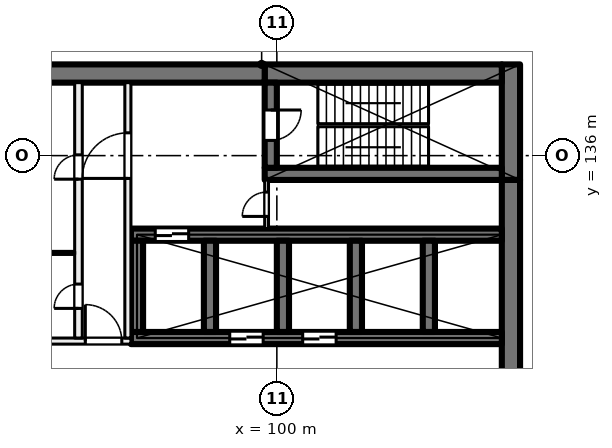
"""IFC4 building model, lengths in metres.
Left out: names, types, materials, properties, quantities, classifications, styles, units other than length and angle.
Written with IfcOpenShell. Run it as: python <this file> out.ifc"""

import sys

from ifc_helpers import new_model, si_unit, direction, frame, frame_2d, origin, place, context, subcontext, project, spatial, rectangle, extrude, element, fill, save


model = new_model("IFC4")
c1 = context("Model", 3, precision=1e-05, world=origin(), true_north=direction((0.0, 1.0)))
c2 = subcontext(c1, "Body", "Model", "MODEL_VIEW")
j1 = project(units=[si_unit("LENGTHUNIT", "METRE"), si_unit("PLANEANGLEUNIT", "RADIAN")], contexts=[c1])
p1 = place(None, origin())
s1 = spatial("IfcSite", under=j1, at=p1, CompositionType="ELEMENT")
p2 = place(p1, origin())
s2 = spatial("IfcBuilding", under=s1, at=p2, CompositionType="ELEMENT")
p3 = place(p2, frame((0.0, 0.0, 12.5)))
s3 = spatial("IfcBuildingStorey", under=s2, at=p3, CompositionType="ELEMENT", Elevation=12.5)
p4 = place(p3, frame((107.7, 139.0, 0.0), z_axis=(0.0, 0.0, 1.0), x_axis=(0.0, -1.0, 0.0)))
e1 = element("IfcWall", 1, at=p4, inside=s3, PredefinedType="SHEAR", context=c2, shape_type="SweptSolid", body=[
    extrude(rectangle(XDim=3.8, YDim=0.6, at=frame_2d((1.9, 0.0))), origin(), (0.0, 0.0, 1.0), 5.0),
])
p5 = place(p3, frame((107.7, 135.2, 0.0), z_axis=(0.0, 0.0, 1.0), x_axis=(0.0, -1.0, 0.0)))
e2 = element("IfcWall", 2, at=p5, inside=s3, PredefinedType="SHEAR", context=c2, shape_type="SweptSolid", body=[
    extrude(rectangle(XDim=14.4, YDim=0.6, at=frame_2d((7.2, 0.0))), origin(), (0.0, 0.0, 1.0), 5.0),
])
p6 = place(p3, frame((107.4, 138.7, 0.0), z_axis=(0.0, 0.0, 1.0), x_axis=(-1.0, 0.0, 0.0)))
e3 = element("IfcWall", 3, at=p6, inside=s3, PredefinedType="SHEAR", context=c2, shape_type="SweptSolid", body=[
    extrude(rectangle(XDim=7.8, YDim=0.6, at=frame_2d((3.9, 0.0))), origin(), (0.0, 0.0, 1.0), 5.0),
])
p7 = place(p3, frame((99.6, 138.7, 0.0), z_axis=(0.0, 0.0, 1.0), x_axis=(-1.0, 0.0, 0.0)))
e4 = element("IfcWall", 4, at=p7, inside=s3, PredefinedType="SHEAR", context=c2, shape_type="SweptSolid", body=[
    extrude(rectangle(XDim=8.9, YDim=0.6, at=frame_2d((4.45, 0.0))), origin(), (0.0, 0.0, 1.0), 5.0),
])
p8 = place(p3, frame((107.4, 135.4, 0.0), z_axis=(0.0, 0.0, 1.0), x_axis=(-1.0, 0.0, 0.0)))
e5 = element("IfcWall", 5, at=p8, inside=s3, PredefinedType="SHEAR", context=c2, shape_type="SweptSolid", body=[
    extrude(rectangle(XDim=7.8, YDim=0.4, at=frame_2d((3.9, 0.0))), origin(), (0.0, 0.0, 1.0), 5.0),
])
p9 = place(p3, frame((99.8, 138.4, 0.0), z_axis=(0.0, 0.0, 1.0), x_axis=(0.0, -1.0, 0.0)))
e6 = element("IfcWall", 6, at=p9, inside=s3, PredefinedType="SHEAR", context=c2, shape_type="SweptSolid", body=[
    extrude(rectangle(XDim=2.8, YDim=0.4, at=frame_2d((1.4, 0.0))), origin(), (0.0, 0.0, 1.0), 5.0),
])
p10 = place(p9, frame((0.9, 0.0, 0.0)))
e7 = element("IfcOpeningElement", 7, at=p10, cuts=e6, PredefinedType="OPENING", context=c2, shape_type="SweptSolid", body=[
    extrude(rectangle(XDim=1.0, YDim=2.1, at=frame_2d((0.5, 1.05))), frame((0.0, 0.21, 0.0), z_axis=(0.0, -1.0, 0.0), x_axis=(1.0, 0.0, 0.0)), (0.0, 0.0, 1.0), 0.42),
])
p11 = place(p3, frame((107.4, 130.0, 0.0), z_axis=(0.0, 0.0, 1.0), x_axis=(-1.0, 0.0, 0.0)))
e8 = element("IfcWall", 8, at=p11, inside=s3, PredefinedType="SHEAR", context=c2, shape_type="SweptSolid", body=[
    extrude(rectangle(XDim=12.2, YDim=0.4, at=frame_2d((6.1, 0.0))), origin(), (0.0, 0.0, 1.0), 5.0),
])
p12 = place(p11, frame((5.45, 0.0, 0.0)))
e9 = element("IfcOpeningElement", 9, at=p12, cuts=e8, PredefinedType="OPENING", context=c2, shape_type="SweptSolid", body=[
    extrude(rectangle(XDim=1.1, YDim=2.1, at=frame_2d((0.55, 1.05))), frame((0.0, 0.21, 0.0), z_axis=(0.0, -1.0, 0.0), x_axis=(1.0, 0.0, 0.0)), (0.0, 0.0, 1.0), 0.42),
])
p13 = place(p11, frame((7.85, 0.0, 0.0)))
e10 = element("IfcOpeningElement", 10, at=p13, cuts=e8, PredefinedType="OPENING", context=c2, shape_type="SweptSolid", body=[
    extrude(rectangle(XDim=1.1, YDim=2.1, at=frame_2d((0.55, 1.05))), frame((0.0, 0.21, 0.0), z_axis=(0.0, -1.0, 0.0), x_axis=(1.0, 0.0, 0.0)), (0.0, 0.0, 1.0), 0.42),
])
p14 = place(p3, frame((107.4, 133.4, 0.0), z_axis=(0.0, 0.0, 1.0), x_axis=(-1.0, 0.0, 0.0)))
e11 = element("IfcWall", 11, at=p14, inside=s3, PredefinedType="SHEAR", context=c2, shape_type="SweptSolid", body=[
    extrude(rectangle(XDim=12.2, YDim=0.4, at=frame_2d((6.1, 0.0))), origin(), (0.0, 0.0, 1.0), 5.0),
])
p15 = place(p14, frame((10.3, 0.0, 0.0)))
e12 = element("IfcOpeningElement", 12, at=p15, cuts=e11, PredefinedType="OPENING", context=c2, shape_type="SweptSolid", body=[
    extrude(rectangle(XDim=1.1, YDim=2.1, at=frame_2d((0.55, 1.05))), frame((0.0, 0.21, 0.0), z_axis=(0.0, -1.0, 0.0), x_axis=(1.0, 0.0, 0.0)), (0.0, 0.0, 1.0), 0.42),
])
for number, where, z_axis, x_axis in (
    (13, (105.0, 133.2, 0.0), (0.0, 0.0, 1.0), (0.0, -1.0, 0.0)),
    (14, (102.6, 133.2, 0.0), (0.0, 0.0, 1.0), (0.0, -1.0, 0.0)),
    (15, (100.2, 133.2, 0.0), (0.0, 0.0, 1.0), (0.0, -1.0, 0.0)),
    (16, (97.8, 133.2, 0.0), (0.0, 0.0, 1.0), (0.0, -1.0, 0.0)),
    (17, (95.4, 133.2, 0.0), (0.0, 0.0, 1.0), (0.0, -1.0, 0.0)),
):
    element("IfcWall", number, at=place(p3, frame(where, z_axis=z_axis, x_axis=x_axis)), inside=s3, PredefinedType="SHEAR", context=c2, shape_type="SweptSolid", body=[
        extrude(rectangle(XDim=3.0, YDim=0.4, at=frame_2d((1.5, 0.0))), origin(), (0.0, 0.0, 1.0), 5.0),
    ])
p16 = place(p3, frame((91.4, 129.9, 0.0), z_axis=(0.0, 0.0, 1.0), x_axis=(1.0, 0.0, 0.0)))
e18 = element("IfcWall", 18, at=p16, inside=s3, PredefinedType="PARTITIONING", context=c2, shape_type="SweptSolid", body=[
    extrude(rectangle(XDim=3.8, YDim=0.2, at=frame_2d((1.9, 0.0))), origin(), (0.0, 0.0, 1.0), 4.6),
])
p17 = place(p16, frame((2.3, 0.0, 0.0)))
e19 = element("IfcOpeningElement", 19, at=p17, cuts=e18, PredefinedType="OPENING", context=c2, shape_type="SweptSolid", body=[
    extrude(rectangle(XDim=1.2, YDim=2.1, at=frame_2d((0.6, 1.05))), frame((0.0, 0.11, 0.0), z_axis=(0.0, -1.0, 0.0), x_axis=(1.0, 0.0, 0.0)), (0.0, 0.0, 1.0), 0.22),
])
p18 = place(p3, frame((95.1, 130.0, 0.0), z_axis=(0.0, 0.0, 1.0), x_axis=(0.0, 1.0, 0.0)))
e20 = element("IfcWall", 20, at=p18, inside=s3, PredefinedType="PARTITIONING", context=c2, shape_type="SweptSolid", body=[
    extrude(rectangle(XDim=8.4, YDim=0.2, at=frame_2d((4.2, 0.0))), origin(), (0.0, 0.0, 1.0), 4.6),
])
p19 = place(p18, frame((5.25, 0.0, 0.0)))
e21 = element("IfcOpeningElement", 21, at=p19, cuts=e20, PredefinedType="OPENING", context=c2, shape_type="SweptSolid", body=[
    extrude(rectangle(XDim=1.5, YDim=2.1, at=frame_2d((0.75, 1.05))), frame((0.0, 0.11, 0.0), z_axis=(0.0, -1.0, 0.0), x_axis=(1.0, 0.0, 0.0)), (0.0, 0.0, 1.0), 0.22),
])
p20 = place(p3, frame((93.475, 130.0, 0.0), z_axis=(0.0, 0.0, 1.0), x_axis=(0.0, 1.0, 0.0)))
e22 = element("IfcWall", 22, at=p20, inside=s3, PredefinedType="PARTITIONING", context=c2, shape_type="SweptSolid", body=[
    extrude(rectangle(XDim=8.4, YDim=0.25, at=frame_2d((4.2, 0.0))), origin(), (0.0, 0.0, 1.0), 4.6),
])
p21 = place(p20, frame((0.975, 0.0, 0.0)))
e23 = element("IfcOpeningElement", 23, at=p21, cuts=e22, PredefinedType="OPENING", context=c2, shape_type="SweptSolid", body=[
    extrude(rectangle(XDim=0.8, YDim=2.1, at=frame_2d((0.4, 1.05))), frame((0.0, 0.135, 0.0), z_axis=(0.0, -1.0, 0.0), x_axis=(1.0, 0.0, 0.0)), (0.0, 0.0, 1.0), 0.27),
])
p22 = place(p20, frame((5.225, 0.0, 0.0)))
e24 = element("IfcOpeningElement", 24, at=p22, cuts=e22, PredefinedType="OPENING", context=c2, shape_type="SweptSolid", body=[
    extrude(rectangle(XDim=0.8, YDim=2.1, at=frame_2d((0.4, 1.05))), frame((0.0, 0.135, 0.0), z_axis=(0.0, -1.0, 0.0), x_axis=(1.0, 0.0, 0.0)), (0.0, 0.0, 1.0), 0.27),
])
p23 = place(p3, frame((99.663, 133.6, 0.0), z_axis=(0.0, 0.0, 1.0), x_axis=(0.0, 1.0, 0.0)))
e25 = element("IfcWall", 25, at=p23, inside=s3, PredefinedType="PARTITIONING", context=c2, shape_type="SweptSolid", body=[
    extrude(rectangle(XDim=1.6, YDim=0.125, at=frame_2d((0.8, 0.0))), origin(), (0.0, 0.0, 1.0), 4.6),
])
p24 = place(p23, frame((0.4, 0.0, 0.0)))
e26 = element("IfcOpeningElement", 26, at=p24, cuts=e25, PredefinedType="OPENING", context=c2, shape_type="SweptSolid", body=[
    extrude(rectangle(XDim=0.8, YDim=2.1, at=frame_2d((0.4, 1.05))), frame((0.0, 0.073, 0.0), z_axis=(0.0, -1.0, 0.0), x_axis=(1.0, 0.0, 0.0)), (0.0, 0.0, 1.0), 0.145),
])
p25 = place(p3, frame((91.4, 132.8, 0.0), z_axis=(0.0, 0.0, 1.0), x_axis=(1.0, 0.0, 0.0)))
e27 = element("IfcWall", 27, at=p25, inside=s3, PredefinedType="PARTITIONING", context=c2, shape_type="SweptSolid", body=[
    extrude(rectangle(XDim=1.95, YDim=0.1, at=frame_2d((0.975, 0.0))), origin(), (0.0, 0.0, 1.0), 4.6),
])
p26 = place(p12, origin())
e28 = element("IfcDoor", 28, at=p26, inside=s3, OperationType="DOUBLE_DOOR_SLIDING", PredefinedType="DOOR", context=c2, shape_type="SweptSolid", body=[
    extrude(rectangle(XDim=1.1, YDim=2.1, at=frame_2d((0.55, 1.05))), frame((0.0, 0.025, 0.0), z_axis=(0.0, -1.0, 0.0), x_axis=(1.0, 0.0, 0.0)), (0.0, 0.0, 1.0), 0.05),
])
fill(e9, e28)
p27 = place(p13, origin())
e29 = element("IfcDoor", 29, at=p27, inside=s3, OperationType="DOUBLE_DOOR_SLIDING", PredefinedType="DOOR", context=c2, shape_type="SweptSolid", body=[
    extrude(rectangle(XDim=1.1, YDim=2.1, at=frame_2d((0.55, 1.05))), frame((0.0, 0.025, 0.0), z_axis=(0.0, -1.0, 0.0), x_axis=(1.0, 0.0, 0.0)), (0.0, 0.0, 1.0), 0.05),
])
fill(e10, e29)
p28 = place(p17, origin())
e30 = element("IfcDoor", 30, at=p28, inside=s3, OperationType="DOUBLE_DOOR_SINGLE_SWING", PredefinedType="DOOR", context=c2, shape_type="SweptSolid", body=[
    extrude(rectangle(XDim=1.2, YDim=2.1, at=frame_2d((0.6, 1.05))), frame((0.0, 0.025, 0.0), z_axis=(0.0, -1.0, 0.0), x_axis=(1.0, 0.0, 0.0)), (0.0, 0.0, 1.0), 0.05),
])
fill(e19, e30)
p29 = place(p19, origin())
e31 = element("IfcDoor", 31, at=p29, inside=s3, OperationType="DOUBLE_DOOR_SINGLE_SWING", PredefinedType="DOOR", context=c2, shape_type="SweptSolid", body=[
    extrude(rectangle(XDim=1.5, YDim=2.1, at=frame_2d((0.75, 1.05))), frame((0.0, 0.025, 0.0), z_axis=(0.0, -1.0, 0.0), x_axis=(1.0, 0.0, 0.0)), (0.0, 0.0, 1.0), 0.05),
])
fill(e21, e31)
p30 = place(p10, origin())
e32 = element("IfcDoor", 32, at=p30, inside=s3, OperationType="SINGLE_SWING_RIGHT", PredefinedType="DOOR", context=c2, shape_type="SweptSolid", body=[
    extrude(rectangle(XDim=1.0, YDim=2.1, at=frame_2d((0.5, 1.05))), frame((0.0, 0.025, 0.0), z_axis=(0.0, -1.0, 0.0), x_axis=(1.0, 0.0, 0.0)), (0.0, 0.0, 1.0), 0.05),
])
fill(e7, e32)
p31 = place(p24, origin())
e33 = element("IfcDoor", 33, at=p31, inside=s3, OperationType="SINGLE_SWING_LEFT", PredefinedType="DOOR", context=c2, shape_type="SweptSolid", body=[
    extrude(rectangle(XDim=0.8, YDim=2.1, at=frame_2d((0.4, 1.05))), frame((0.0, 0.025, 0.0), z_axis=(0.0, -1.0, 0.0), x_axis=(1.0, 0.0, 0.0)), (0.0, 0.0, 1.0), 0.05),
])
fill(e26, e33)
p32 = place(p21, origin())
e34 = element("IfcDoor", 34, at=p32, inside=s3, OperationType="SINGLE_SWING_RIGHT", PredefinedType="DOOR", context=c2, shape_type="SweptSolid", body=[
    extrude(rectangle(XDim=0.8, YDim=2.1, at=frame_2d((0.4, 1.05))), frame((0.0, 0.025, 0.0), z_axis=(0.0, -1.0, 0.0), x_axis=(1.0, 0.0, 0.0)), (0.0, 0.0, 1.0), 0.05),
])
fill(e23, e34)
p33 = place(p22, origin())
e35 = element("IfcDoor", 35, at=p33, inside=s3, OperationType="SINGLE_SWING_LEFT", PredefinedType="DOOR", context=c2, shape_type="SweptSolid", body=[
    extrude(rectangle(XDim=0.8, YDim=2.1, at=frame_2d((0.4, 1.05))), frame((0.0, 0.025, 0.0), z_axis=(0.0, -1.0, 0.0), x_axis=(1.0, 0.0, 0.0)), (0.0, 0.0, 1.0), 0.05),
])
fill(e24, e35)
p34 = place(p15, origin())
e36 = element("IfcDoor", 36, at=p34, inside=s3, OperationType="DOUBLE_DOOR_SLIDING", PredefinedType="DOOR", context=c2, shape_type="SweptSolid", body=[
    extrude(rectangle(XDim=1.1, YDim=2.1, at=frame_2d((0.55, 1.05))), frame((0.0, 0.025, 0.0), z_axis=(0.0, -1.0, 0.0), x_axis=(1.0, 0.0, 0.0)), (0.0, 0.0, 1.0), 0.05),
])
fill(e12, e36)
save(model, sys.argv[1])
